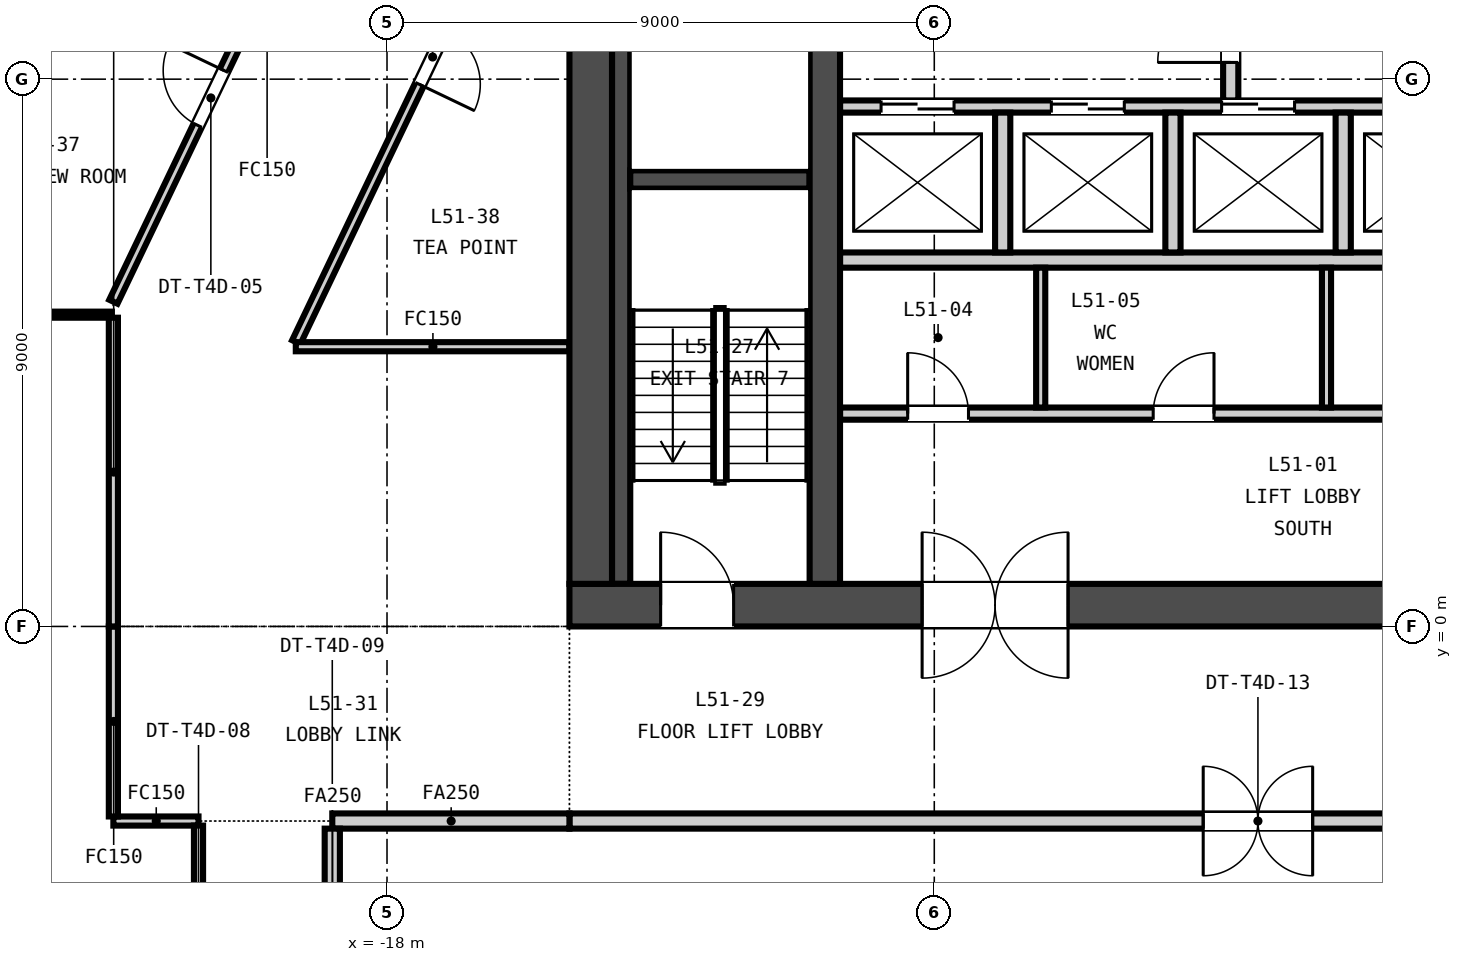
"""IFC4 building model, lengths in metres.
Left out: names, types, materials, properties, quantities, classifications, styles, units other than length and angle.
Written with IfcOpenShell. Run it as: python <this file> out.ifc"""

import sys

from ifc_helpers import new_model, si_unit, direction, frame, frame_2d, origin, place, context, subcontext, project, spatial, rectangle, extrude, element, fill, save


model = new_model("IFC4")
c1 = context("Model", 3, precision=1e-05, world=origin(), true_north=direction((0.0, 1.0)))
c2 = subcontext(c1, "Body", "Model", "MODEL_VIEW")
j1 = project(units=[si_unit("LENGTHUNIT", "METRE"), si_unit("PLANEANGLEUNIT", "RADIAN")], contexts=[c1])
p1 = place(None, origin())
s1 = spatial("IfcSite", under=j1, at=p1, CompositionType="ELEMENT")
p2 = place(p1, origin())
s2 = spatial("IfcBuilding", under=s1, at=p2, CompositionType="ELEMENT")
p3 = place(p2, frame((0.0, 0.0, 203.65)))
s3 = spatial("IfcBuildingStorey", under=s2, at=p3, CompositionType="ELEMENT", Elevation=203.65)
p4 = place(p3, frame((-15.0, 0.35, -0.15), z_axis=(0.0, 0.0, 1.0), x_axis=(1.0, 0.0, 0.0)))
e1 = element("IfcWall", 1, at=p4, inside=s3, PredefinedType="SOLIDWALL", context=c2, shape_type="SweptSolid", body=[
    extrude(rectangle(XDim=30.0, YDim=0.7, at=frame_2d((15.0, 0.0))), origin(), (0.0, 0.0, 1.0), 3.5),
])
p5 = place(p4, frame((5.8, 0.0, 0.15)))
e2 = element("IfcOpeningElement", 2, at=p5, cuts=e1, PredefinedType="OPENING", context=c2, shape_type="SweptSolid", body=[
    extrude(rectangle(XDim=2.4, YDim=2.4, at=frame_2d((1.2, 1.2))), frame((0.0, 0.36, 0.0), z_axis=(0.0, -1.0, 0.0), x_axis=(1.0, 0.0, 0.0)), (0.0, 0.0, 1.0), 0.72),
])
p6 = place(p4, frame((13.8, 0.0, 0.15)))
e3 = element("IfcOpeningElement", 3, at=p6, cuts=e1, PredefinedType="OPENING", context=c2, shape_type="SweptSolid", body=[
    extrude(rectangle(XDim=2.4, YDim=2.4, at=frame_2d((1.2, 1.2))), frame((0.0, 0.36, 0.0), z_axis=(0.0, -1.0, 0.0), x_axis=(1.0, 0.0, 0.0)), (0.0, 0.0, 1.0), 0.72),
])
p7 = place(p4, frame((21.8, 0.0, 0.15)))
e4 = element("IfcOpeningElement", 4, at=p7, cuts=e1, PredefinedType="OPENING", context=c2, shape_type="SweptSolid", body=[
    extrude(rectangle(XDim=2.4, YDim=2.4, at=frame_2d((1.2, 1.2))), frame((0.0, 0.36, 0.0), z_axis=(0.0, -1.0, 0.0), x_axis=(1.0, 0.0, 0.0)), (0.0, 0.0, 1.0), 0.72),
])
p8 = place(p4, frame((1.5, 0.0, 0.15)))
e5 = element("IfcOpeningElement", 5, at=p8, cuts=e1, PredefinedType="OPENING", context=c2, shape_type="SweptSolid", body=[
    extrude(rectangle(XDim=1.2, YDim=2.1, at=frame_2d((0.6, 1.05))), frame((0.0, 0.36, 0.0), z_axis=(0.0, -1.0, 0.0), x_axis=(1.0, 0.0, 0.0)), (0.0, 0.0, 1.0), 0.72),
])
p9 = place(p4, frame((27.3, 0.0, 0.15)))
e6 = element("IfcOpeningElement", 6, at=p9, cuts=e1, PredefinedType="OPENING", context=c2, shape_type="SweptSolid", body=[
    extrude(rectangle(XDim=1.2, YDim=2.1, at=frame_2d((0.6, 1.05))), frame((0.0, 0.36, 0.0), z_axis=(0.0, -1.0, 0.0), x_axis=(1.0, 0.0, 0.0)), (0.0, 0.0, 1.0), 0.72),
])
p10 = place(p3, frame((-14.65, 0.7, -0.15), z_axis=(0.0, 0.0, 1.0), x_axis=(0.0, 1.0, 0.0)))
e7 = element("IfcWall", 7, at=p10, inside=s3, PredefinedType="SOLIDWALL", context=c2, shape_type="SweptSolid", body=[
    extrude(rectangle(XDim=13.6, YDim=0.7, at=frame_2d((6.8, 0.0))), origin(), (0.0, 0.0, 1.0), 3.5),
])
p11 = place(p3, frame((-10.8, 0.7, -0.15), z_axis=(0.0, 0.0, 1.0), x_axis=(0.0, 1.0, 0.0)))
e8 = element("IfcWall", 8, at=p11, inside=s3, PredefinedType="SOLIDWALL", context=c2, shape_type="SweptSolid", body=[
    extrude(rectangle(XDim=13.6, YDim=0.5, at=frame_2d((6.8, 0.0))), origin(), (0.0, 0.0, 1.0), 3.5),
])
p12 = place(p3, frame((-10.55, 3.5, 0.0), z_axis=(0.0, 0.0, 1.0), x_axis=(1.0, 0.0, 0.0)))
e9 = element("IfcWall", 9, at=p12, inside=s3, PredefinedType="PARTITIONING", context=c2, shape_type="SweptSolid", body=[
    extrude(rectangle(XDim=21.1, YDim=0.2, at=frame_2d((10.55, 0.0))), origin(), (0.0, 0.0, 1.0), 3.35),
])
p13 = place(p12, frame((1.113, 0.0, 0.0)))
e10 = element("IfcOpeningElement", 10, at=p13, cuts=e9, PredefinedType="OPENING", context=c2, shape_type="SweptSolid", body=[
    extrude(rectangle(XDim=1.0, YDim=2.1, at=frame_2d((0.5, 1.05))), frame((0.0, 0.11, 0.0), z_axis=(0.0, -1.0, 0.0), x_axis=(1.0, 0.0, 0.0)), (0.0, 0.0, 1.0), 0.22),
])
p14 = place(p12, frame((5.15, 0.0, 0.0)))
e11 = element("IfcOpeningElement", 11, at=p14, cuts=e9, PredefinedType="OPENING", context=c2, shape_type="SweptSolid", body=[
    extrude(rectangle(XDim=1.0, YDim=2.1, at=frame_2d((0.5, 1.05))), frame((0.0, 0.11, 0.0), z_axis=(0.0, -1.0, 0.0), x_axis=(1.0, 0.0, 0.0)), (0.0, 0.0, 1.0), 0.22),
])
p15 = place(p12, frame((9.85, 0.0, 0.0)))
e12 = element("IfcOpeningElement", 12, at=p15, cuts=e9, PredefinedType="OPENING", context=c2, shape_type="SweptSolid", body=[
    extrude(rectangle(XDim=1.0, YDim=2.1, at=frame_2d((0.5, 1.05))), frame((0.0, 0.11, 0.0), z_axis=(0.0, -1.0, 0.0), x_axis=(1.0, 0.0, 0.0)), (0.0, 0.0, 1.0), 0.22),
])
p16 = place(p12, frame((13.4, 0.0, 0.0)))
e13 = element("IfcOpeningElement", 13, at=p16, cuts=e9, PredefinedType="OPENING", context=c2, shape_type="SweptSolid", body=[
    extrude(rectangle(XDim=1.0, YDim=2.1, at=frame_2d((0.5, 1.05))), frame((0.0, 0.11, 0.0), z_axis=(0.0, -1.0, 0.0), x_axis=(1.0, 0.0, 0.0)), (0.0, 0.0, 1.0), 0.22),
])
p17 = place(p12, frame((16.762, 0.0, 0.0)))
e14 = element("IfcOpeningElement", 14, at=p17, cuts=e9, PredefinedType="OPENING", context=c2, shape_type="SweptSolid", body=[
    extrude(rectangle(XDim=1.0, YDim=2.1, at=frame_2d((0.5, 1.05))), frame((0.0, 0.11, 0.0), z_axis=(0.0, -1.0, 0.0), x_axis=(1.0, 0.0, 0.0)), (0.0, 0.0, 1.0), 0.22),
])
p18 = place(p12, frame((19.9, 0.0, 0.0)))
e15 = element("IfcOpeningElement", 15, at=p18, cuts=e9, PredefinedType="OPENING", context=c2, shape_type="SweptSolid", body=[
    extrude(rectangle(XDim=0.9, YDim=2.1, at=frame_2d((0.45, 1.05))), frame((0.0, 0.11, 0.0), z_axis=(0.0, -1.0, 0.0), x_axis=(1.0, 0.0, 0.0)), (0.0, 0.0, 1.0), 0.22),
])
p19 = place(p3, frame((-10.55, 6.025, 0.0), z_axis=(0.0, 0.0, 1.0), x_axis=(1.0, 0.0, 0.0)))
e16 = element("IfcWall", 16, at=p19, inside=s3, PredefinedType="PARTITIONING", context=c2, shape_type="SweptSolid", body=[
    extrude(rectangle(XDim=21.1, YDim=0.25, at=frame_2d((10.55, 0.0))), origin(), (0.0, 0.0, 1.0), 3.35),
])
p20 = place(p3, frame((-10.55, 8.55, 0.0), z_axis=(0.0, 0.0, 1.0), x_axis=(1.0, 0.0, 0.0)))
e17 = element("IfcWall", 17, at=p20, inside=s3, PredefinedType="PARTITIONING", context=c2, shape_type="SweptSolid", body=[
    extrude(rectangle(XDim=21.1, YDim=0.2, at=frame_2d((10.55, 0.0))), origin(), (0.0, 0.0, 1.0), 3.35),
])
p21 = place(p20, frame((0.675, 0.0, 0.0)))
e18 = element("IfcOpeningElement", 18, at=p21, cuts=e17, PredefinedType="OPENING", context=c2, shape_type="SweptSolid", body=[
    extrude(rectangle(XDim=1.2, YDim=2.1, at=frame_2d((0.6, 1.05))), frame((0.0, 0.11, 0.0), z_axis=(0.0, -1.0, 0.0), x_axis=(1.0, 0.0, 0.0)), (0.0, 0.0, 1.0), 0.22),
])
p22 = place(p20, frame((3.475, 0.0, 0.0)))
e19 = element("IfcOpeningElement", 19, at=p22, cuts=e17, PredefinedType="OPENING", context=c2, shape_type="SweptSolid", body=[
    extrude(rectangle(XDim=1.2, YDim=2.1, at=frame_2d((0.6, 1.05))), frame((0.0, 0.11, 0.0), z_axis=(0.0, -1.0, 0.0), x_axis=(1.0, 0.0, 0.0)), (0.0, 0.0, 1.0), 0.22),
])
p23 = place(p20, frame((6.275, 0.0, 0.0)))
e20 = element("IfcOpeningElement", 20, at=p23, cuts=e17, PredefinedType="OPENING", context=c2, shape_type="SweptSolid", body=[
    extrude(rectangle(XDim=1.2, YDim=2.1, at=frame_2d((0.6, 1.05))), frame((0.0, 0.11, 0.0), z_axis=(0.0, -1.0, 0.0), x_axis=(1.0, 0.0, 0.0)), (0.0, 0.0, 1.0), 0.22),
])
p24 = place(p20, frame((9.075, 0.0, 0.0)))
e21 = element("IfcOpeningElement", 21, at=p24, cuts=e17, PredefinedType="OPENING", context=c2, shape_type="SweptSolid", body=[
    extrude(rectangle(XDim=1.2, YDim=2.1, at=frame_2d((0.6, 1.05))), frame((0.0, 0.11, 0.0), z_axis=(0.0, -1.0, 0.0), x_axis=(1.0, 0.0, 0.0)), (0.0, 0.0, 1.0), 0.22),
])
p25 = place(p20, frame((11.875, 0.0, 0.0)))
e22 = element("IfcOpeningElement", 22, at=p25, cuts=e17, PredefinedType="OPENING", context=c2, shape_type="SweptSolid", body=[
    extrude(rectangle(XDim=1.2, YDim=2.1, at=frame_2d((0.6, 1.05))), frame((0.0, 0.11, 0.0), z_axis=(0.0, -1.0, 0.0), x_axis=(1.0, 0.0, 0.0)), (0.0, 0.0, 1.0), 0.22),
])
p26 = place(p20, frame((14.675, 0.0, 0.0)))
e23 = element("IfcOpeningElement", 23, at=p26, cuts=e17, PredefinedType="OPENING", context=c2, shape_type="SweptSolid", body=[
    extrude(rectangle(XDim=1.2, YDim=2.1, at=frame_2d((0.6, 1.05))), frame((0.0, 0.11, 0.0), z_axis=(0.0, -1.0, 0.0), x_axis=(1.0, 0.0, 0.0)), (0.0, 0.0, 1.0), 0.22),
])
p27 = place(p20, frame((17.475, 0.0, 0.0)))
e24 = element("IfcOpeningElement", 24, at=p27, cuts=e17, PredefinedType="OPENING", context=c2, shape_type="SweptSolid", body=[
    extrude(rectangle(XDim=1.2, YDim=2.1, at=frame_2d((0.6, 1.05))), frame((0.0, 0.11, 0.0), z_axis=(0.0, -1.0, 0.0), x_axis=(1.0, 0.0, 0.0)), (0.0, 0.0, 1.0), 0.22),
])
p28 = place(p20, frame((19.9, 0.0, 0.0)))
e25 = element("IfcOpeningElement", 25, at=p28, cuts=e17, PredefinedType="OPENING", context=c2, shape_type="SweptSolid", body=[
    extrude(rectangle(XDim=0.9, YDim=2.1, at=frame_2d((0.45, 1.05))), frame((0.0, 0.11, 0.0), z_axis=(0.0, -1.0, 0.0), x_axis=(1.0, 0.0, 0.0)), (0.0, 0.0, 1.0), 0.22),
])
p29 = place(p3, frame((-4.125, 8.65, 0.0), z_axis=(0.0, 0.0, 1.0), x_axis=(0.0, 1.0, 0.0)))
e26 = element("IfcWall", 26, at=p29, inside=s3, PredefinedType="PARTITIONING", context=c2, shape_type="SweptSolid", body=[
    extrude(rectangle(XDim=2.45, YDim=0.25, at=frame_2d((1.225, 0.0))), origin(), (0.0, 0.0, 1.0), 3.35),
])
p30 = place(p29, frame((0.625, 0.0, 0.0)))
e27 = element("IfcOpeningElement", 27, at=p30, cuts=e26, PredefinedType="OPENING", context=c2, shape_type="SweptSolid", body=[
    extrude(rectangle(XDim=1.2, YDim=2.1, at=frame_2d((0.6, 1.05))), frame((0.0, 0.135, 0.0), z_axis=(0.0, -1.0, 0.0), x_axis=(1.0, 0.0, 0.0)), (0.0, 0.0, 1.0), 0.27),
])
for number, where, z_axis, x_axis in (
    (28, (-7.25, 3.6, 0.0), (0.0, 0.0, 1.0), (0.0, 1.0, 0.0)),
    (29, (-2.55, 3.6, 0.0), (0.0, 0.0, 1.0), (0.0, 1.0, 0.0)),
):
    element("IfcWall", number, at=place(p3, frame(where, z_axis=z_axis, x_axis=x_axis)), inside=s3, PredefinedType="PARTITIONING", context=c2, shape_type="SweptSolid", body=[
        extrude(rectangle(XDim=2.3, YDim=0.15, at=frame_2d((1.15, 0.0))), origin(), (0.0, 0.0, 1.0), 3.35),
    ])
for number, where, z_axis, x_axis in (
    (30, (-7.875, 6.15, 0.0), (0.0, 0.0, 1.0), (0.0, 1.0, 0.0)),
    (31, (-5.075, 6.15, 0.0), (0.0, 0.0, 1.0), (0.0, 1.0, 0.0)),
    (32, (-2.275, 6.15, 0.0), (0.0, 0.0, 1.0), (0.0, 1.0, 0.0)),
):
    element("IfcWall", number, at=place(p3, frame(where, z_axis=z_axis, x_axis=x_axis)), inside=s3, PredefinedType="PARTITIONING", context=c2, shape_type="SweptSolid", body=[
        extrude(rectangle(XDim=2.3, YDim=0.25, at=frame_2d((1.15, 0.0))), origin(), (0.0, 0.0, 1.0), 3.35),
    ])
p31 = place(p3, frame((-14.0, 7.35, 0.0), z_axis=(0.0, 0.0, 1.0), x_axis=(1.0, 0.0, 0.0)))
e33 = element("IfcWall", 33, at=p31, inside=s3, PredefinedType="SOLIDWALL", context=c2, shape_type="SweptSolid", body=[
    extrude(rectangle(XDim=2.95, YDim=0.3, at=frame_2d((1.475, 0.0))), origin(), (0.0, 0.0, 1.0), 3.35),
])
p32 = place(p3, frame((-14.15, 0.7, 0.0), z_axis=(0.0, 0.0, 1.0), x_axis=(0.0, 1.0, 0.0)))
e34 = element("IfcWall", 34, at=p32, inside=s3, PredefinedType="SOLIDWALL", context=c2, shape_type="SweptSolid", body=[
    extrude(rectangle(XDim=13.6, YDim=0.3, at=frame_2d((6.8, 0.0))), origin(), (0.0, 0.0, 1.0), 3.35),
])
p33 = place(p3, frame((7.645, -3.2, 0.0), z_axis=(0.0, 0.0, 1.0), x_axis=(-1.0, 0.0, 0.0)))
e35 = element("IfcWall", 35, at=p33, inside=s3, PredefinedType="PARTITIONING", context=c2, shape_type="SweptSolid", body=[
    extrude(rectangle(XDim=22.645, YDim=0.25, at=frame_2d((11.323, 0.0))), origin(), (0.0, 0.0, 1.0), 2.591),
])
p34 = place(p33, frame((10.423, 0.0, 0.0)))
e36 = element("IfcOpeningElement", 36, at=p34, cuts=e35, PredefinedType="OPENING", context=c2, shape_type="SweptSolid", body=[
    extrude(rectangle(XDim=1.8, YDim=2.1, at=frame_2d((0.9, 1.05))), frame((0.0, 0.135, 0.0), z_axis=(0.0, -1.0, 0.0), x_axis=(1.0, 0.0, 0.0)), (0.0, 0.0, 1.0), 0.27),
])
p35 = place(p3, frame((-21.1, -3.2, 0.0), z_axis=(0.0, 0.0, 1.0), x_axis=(-1.0, 0.0, 0.0)))
e37 = element("IfcWall", 37, at=p35, inside=s3, PredefinedType="PARTITIONING", context=c2, shape_type="SweptSolid", body=[
    extrude(rectangle(XDim=1.4, YDim=0.15, at=frame_2d((0.7, 0.0))), origin(), (0.0, 0.0, 1.0), 2.591),
])
p36 = place(p3, frame((-15.0, -3.2, 0.0), z_axis=(0.0, 0.0, 1.0), x_axis=(-1.0, 0.0, 0.0)))
e38 = element("IfcWall", 38, at=p36, inside=s3, PredefinedType="PARTITIONING", context=c2, shape_type="SweptSolid", body=[
    extrude(rectangle(XDim=3.9, YDim=0.25, at=frame_2d((1.95, 0.0))), origin(), (0.0, 0.0, 1.0), 2.591),
])
p37 = place(p3, frame((-15.0, 14.069, 0.0), z_axis=(0.0, 0.0, 1.0), x_axis=(-0.43146462293, -0.902129857149, 0.0)))
e39 = element("IfcWall", 39, at=p37, inside=s3, PredefinedType="PARTITIONING", context=c2, shape_type="SweptSolid", body=[
    extrude(rectangle(XDim=10.413, YDim=0.15, at=frame_2d((5.207, 0.0))), origin(), (0.0, 0.0, 1.0), 2.591),
])
p38 = place(p37, frame((4.715, 0.0, 0.0)))
e40 = element("IfcOpeningElement", 40, at=p38, cuts=e39, PredefinedType="OPENING", context=c2, shape_type="SweptSolid", body=[
    extrude(rectangle(XDim=1.0, YDim=2.1, at=frame_2d((0.5, 1.05))), frame((0.0, 0.085, 0.0), z_axis=(0.0, -1.0, 0.0), x_axis=(1.0, 0.0, 0.0)), (0.0, 0.0, 1.0), 0.17),
])
p39 = place(p3, frame((-18.9, -3.325, 0.0), z_axis=(0.0, 0.0, 1.0), x_axis=(0.0, -1.0, 0.0)))
e41 = element("IfcWall", 41, at=p39, inside=s3, PredefinedType="PARTITIONING", context=c2, shape_type="SweptSolid", body=[
    extrude(rectangle(XDim=3.475, YDim=0.25, at=frame_2d((1.738, 0.0))), origin(), (0.0, 0.0, 1.0), 2.591),
])
p40 = place(p3, frame((-22.5, 5.34, 0.0), z_axis=(0.0, 0.0, 1.0), x_axis=(0.431478749841, 0.902123100489, 0.0)))
e42 = element("IfcWall", 42, at=p40, inside=s3, PredefinedType="PARTITIONING", context=c2, shape_type="SweptSolid", body=[
    extrude(rectangle(XDim=7.43, YDim=0.15, at=frame_2d((3.715, 0.0))), origin(), (0.0, 0.0, 1.0), 2.591),
])
p41 = place(p40, frame((3.215, 0.0, 0.0)))
e43 = element("IfcOpeningElement", 43, at=p41, cuts=e42, PredefinedType="OPENING", context=c2, shape_type="SweptSolid", body=[
    extrude(rectangle(XDim=1.0, YDim=2.1, at=frame_2d((0.5, 1.05))), frame((0.0, 0.085, 0.0), z_axis=(0.0, -1.0, 0.0), x_axis=(1.0, 0.0, 0.0)), (0.0, 0.0, 1.0), 0.17),
])
p42 = place(p3, frame((-26.501, 5.127, 0.0), z_axis=(0.0, 0.0, 1.0), x_axis=(1.0, 0.0, 0.0)))
e44 = element("IfcWall", 44, at=p42, inside=s3, PredefinedType="PARTITIONING", context=c2, shape_type="SweptSolid", body=[
    extrude(rectangle(XDim=3.976, YDim=0.1, at=frame_2d((1.988, 0.0))), origin(), (0.0, 0.0, 1.0), 2.591),
])
p43 = place(p3, frame((-19.5, 4.6, 0.0), z_axis=(0.0, 0.0, 1.0), x_axis=(1.0, 0.0, 0.0)))
e45 = element("IfcWall", 45, at=p43, inside=s3, PredefinedType="PARTITIONING", context=c2, shape_type="SweptSolid", body=[
    extrude(rectangle(XDim=4.5, YDim=0.15, at=frame_2d((2.25, 0.0))), origin(), (0.0, 0.0, 1.0), 2.591),
])
p44 = place(p3, frame((-22.5, -3.125, 0.0), z_axis=(0.0, 0.0, 1.0), x_axis=(0.0, 1.0, 0.0)))
e46 = element("IfcWall", 46, at=p44, inside=s3, PredefinedType="PARTITIONING", context=c2, shape_type="SweptSolid", body=[
    extrude(rectangle(XDim=3.125, YDim=0.15, at=frame_2d((1.562, 0.0))), origin(), (0.0, 0.0, 1.0), 2.591),
])
p45 = place(p3, frame((-22.5, 0.0, 0.0), z_axis=(0.0, 0.0, 1.0), x_axis=(0.0, 1.0, 0.0)))
e47 = element("IfcWall", 47, at=p45, inside=s3, PredefinedType="PARTITIONING", context=c2, shape_type="SweptSolid", body=[
    extrude(rectangle(XDim=5.077, YDim=0.15, at=frame_2d((2.539, 0.0))), origin(), (0.0, 0.0, 1.0), 2.591),
])
p46 = place(p3, frame((-21.1, -11.693, 0.0), z_axis=(0.0, 0.0, 1.0), x_axis=(0.0, 1.0, 0.0)))
e48 = element("IfcWall", 48, at=p46, inside=s3, PredefinedType="PARTITIONING", context=c2, shape_type="SweptSolid", body=[
    extrude(rectangle(XDim=8.418, YDim=0.15, at=frame_2d((4.209, 0.0))), origin(), (0.0, 0.0, 1.0), 2.591),
])
p47 = place(p46, frame((3.759, 0.0, 0.0)))
e49 = element("IfcOpeningElement", 49, at=p47, cuts=e48, PredefinedType="OPENING", context=c2, shape_type="SweptSolid", body=[
    extrude(rectangle(XDim=0.9, YDim=2.1, at=frame_2d((0.45, 1.05))), frame((0.0, 0.085, 0.0), z_axis=(0.0, -1.0, 0.0), x_axis=(1.0, 0.0, 0.0)), (0.0, 0.0, 1.0), 0.17),
])
p48 = place(p30, origin())
e50 = element("IfcDoor", 50, at=p48, inside=s3, OperationType="SINGLE_SWING_LEFT", PredefinedType="DOOR", context=c2, shape_type="SweptSolid", body=[
    extrude(rectangle(XDim=1.2, YDim=2.1, at=frame_2d((0.6, 1.05))), frame((0.0, 0.025, 0.0), z_axis=(0.0, -1.0, 0.0), x_axis=(1.0, 0.0, 0.0)), (0.0, 0.0, 1.0), 0.05),
])
fill(e27, e50)
p49 = place(p13, origin())
e51 = element("IfcDoor", 51, at=p49, inside=s3, OperationType="SINGLE_SWING_LEFT", PredefinedType="DOOR", context=c2, shape_type="SweptSolid", body=[
    extrude(rectangle(XDim=1.0, YDim=2.1, at=frame_2d((0.5, 1.05))), frame((0.0, 0.025, 0.0), z_axis=(0.0, -1.0, 0.0), x_axis=(1.0, 0.0, 0.0)), (0.0, 0.0, 1.0), 0.05),
])
fill(e10, e51)
p50 = place(p14, origin())
e52 = element("IfcDoor", 52, at=p50, inside=s3, OperationType="SINGLE_SWING_RIGHT", PredefinedType="DOOR", context=c2, shape_type="SweptSolid", body=[
    extrude(rectangle(XDim=1.0, YDim=2.1, at=frame_2d((0.5, 1.05))), frame((0.0, 0.025, 0.0), z_axis=(0.0, -1.0, 0.0), x_axis=(1.0, 0.0, 0.0)), (0.0, 0.0, 1.0), 0.05),
])
fill(e11, e52)
p51 = place(p21, origin())
e53 = element("IfcDoor", 53, at=p51, inside=s3, OperationType="DOUBLE_DOOR_SLIDING", PredefinedType="DOOR", context=c2, shape_type="SweptSolid", body=[
    extrude(rectangle(XDim=1.2, YDim=2.1, at=frame_2d((0.6, 1.05))), frame((0.0, 0.025, 0.0), z_axis=(0.0, -1.0, 0.0), x_axis=(1.0, 0.0, 0.0)), (0.0, 0.0, 1.0), 0.05),
])
fill(e18, e53)
p52 = place(p22, origin())
e54 = element("IfcDoor", 54, at=p52, inside=s3, OperationType="DOUBLE_DOOR_SLIDING", PredefinedType="DOOR", context=c2, shape_type="SweptSolid", body=[
    extrude(rectangle(XDim=1.2, YDim=2.1, at=frame_2d((0.6, 1.05))), frame((0.0, 0.025, 0.0), z_axis=(0.0, -1.0, 0.0), x_axis=(1.0, 0.0, 0.0)), (0.0, 0.0, 1.0), 0.05),
])
fill(e19, e54)
p53 = place(p23, origin())
e55 = element("IfcDoor", 55, at=p53, inside=s3, OperationType="DOUBLE_DOOR_SLIDING", PredefinedType="DOOR", context=c2, shape_type="SweptSolid", body=[
    extrude(rectangle(XDim=1.2, YDim=2.1, at=frame_2d((0.6, 1.05))), frame((0.0, 0.025, 0.0), z_axis=(0.0, -1.0, 0.0), x_axis=(1.0, 0.0, 0.0)), (0.0, 0.0, 1.0), 0.05),
])
fill(e20, e55)
p54 = place(p5, origin())
e56 = element("IfcDoor", 56, at=p54, inside=s3, OperationType="DOUBLE_DOOR_DOUBLE_SWING", PredefinedType="DOOR", context=c2, shape_type="SweptSolid", body=[
    extrude(rectangle(XDim=2.4, YDim=2.4, at=frame_2d((1.2, 1.2))), frame((0.0, 0.025, 0.0), z_axis=(0.0, -1.0, 0.0), x_axis=(1.0, 0.0, 0.0)), (0.0, 0.0, 1.0), 0.05),
])
fill(e2, e56)
p55 = place(p8, origin())
e57 = element("IfcDoor", 57, at=p55, inside=s3, OperationType="SINGLE_SWING_LEFT", PredefinedType="DOOR", context=c2, shape_type="SweptSolid", body=[
    extrude(rectangle(XDim=1.2, YDim=2.1, at=frame_2d((0.6, 1.05))), frame((0.0, 0.025, 0.0), z_axis=(0.0, -1.0, 0.0), x_axis=(1.0, 0.0, 0.0)), (0.0, 0.0, 1.0), 0.05),
])
fill(e5, e57)
p56 = place(p41, origin())
e58 = element("IfcDoor", 58, at=p56, inside=s3, OperationType="SINGLE_SWING_RIGHT", PredefinedType="DOOR", context=c2, shape_type="SweptSolid", body=[
    extrude(rectangle(XDim=1.0, YDim=2.1, at=frame_2d((0.5, 1.05))), frame((0.0, 0.025, 0.0), z_axis=(0.0, -1.0, 0.0), x_axis=(1.0, 0.0, 0.0)), (0.0, 0.0, 1.0), 0.05),
])
fill(e43, e58)
p57 = place(p38, origin())
e59 = element("IfcDoor", 59, at=p57, inside=s3, OperationType="SINGLE_SWING_RIGHT", PredefinedType="DOOR", context=c2, shape_type="SweptSolid", body=[
    extrude(rectangle(XDim=1.0, YDim=2.1, at=frame_2d((0.5, 1.05))), frame((0.0, 0.025, 0.0), z_axis=(0.0, -1.0, 0.0), x_axis=(1.0, 0.0, 0.0)), (0.0, 0.0, 1.0), 0.05),
])
fill(e40, e59)
p58 = place(p34, origin())
e60 = element("IfcDoor", 60, at=p58, inside=s3, OperationType="DOUBLE_DOOR_DOUBLE_SWING", PredefinedType="DOOR", context=c2, shape_type="SweptSolid", body=[
    extrude(rectangle(XDim=1.8, YDim=2.1, at=frame_2d((0.9, 1.05))), frame((0.0, 0.025, 0.0), z_axis=(0.0, -1.0, 0.0), x_axis=(1.0, 0.0, 0.0)), (0.0, 0.0, 1.0), 0.05),
])
fill(e36, e60)
save(model, sys.argv[1])
